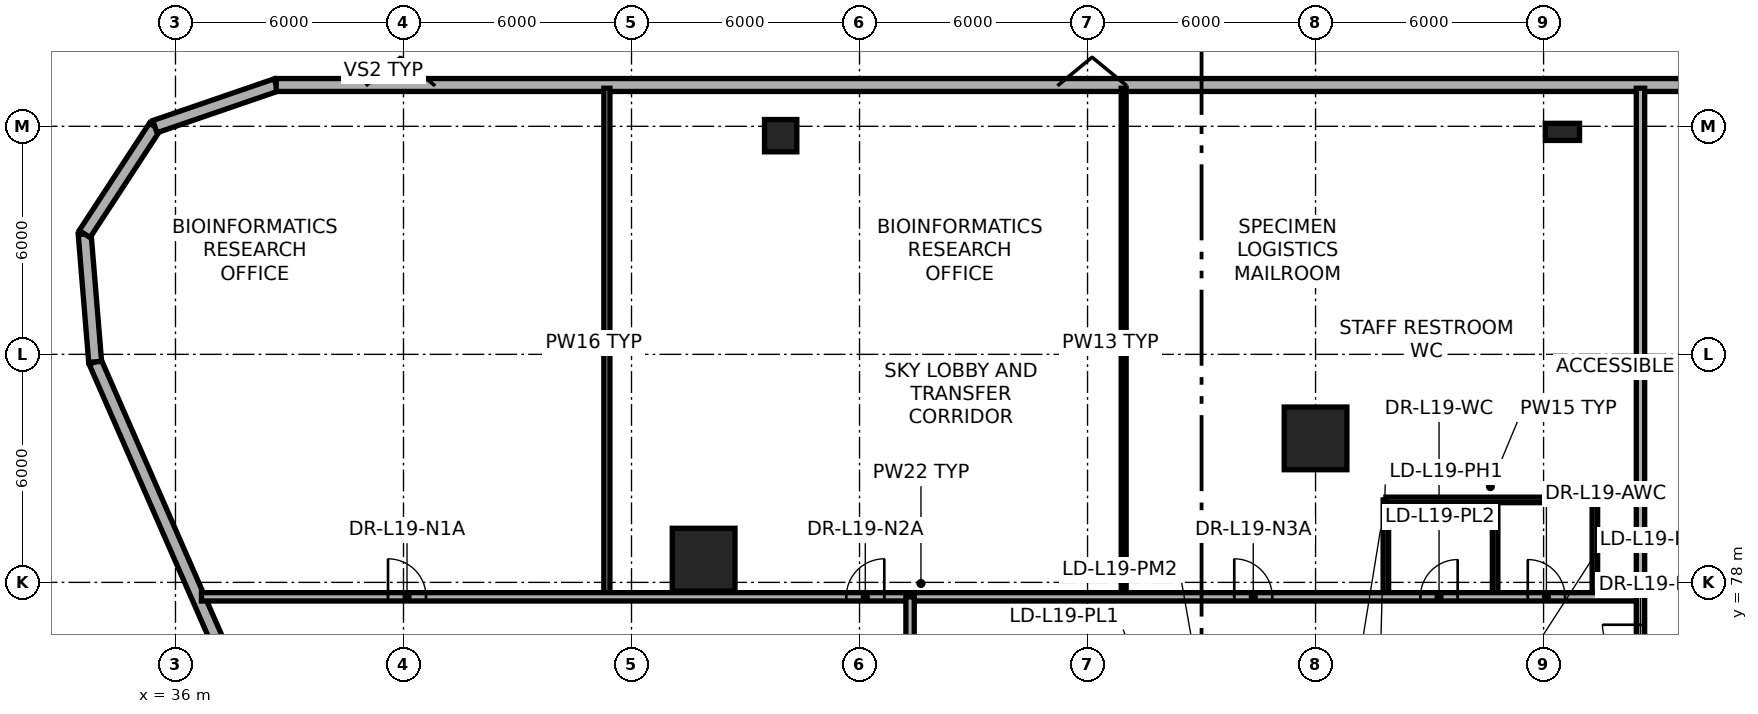
"""IFC4 building model, lengths in metres.
Left out: names, types, materials, properties, quantities, classifications, styles, units other than length and angle.
Written with IfcOpenShell. Run it as: python <this file> out.ifc"""

import sys

from ifc_helpers import new_model, si_unit, direction, frame, frame_2d, origin, origin_2d, place, context, subcontext, project, spatial, rectangle, extrude, element, fill, save


model = new_model("IFC4")
c1 = context("Model", 3, precision=1e-05, world=origin(), true_north=direction((0.0, 1.0)))
c2 = subcontext(c1, "Body", "Model", "MODEL_VIEW")
j1 = project(units=[si_unit("LENGTHUNIT", "METRE"), si_unit("PLANEANGLEUNIT", "RADIAN")], contexts=[c1])
p1 = place(None, origin())
s1 = spatial("IfcSite", under=j1, at=p1, CompositionType="ELEMENT")
p2 = place(p1, origin())
s2 = spatial("IfcBuilding", under=s1, at=p2, CompositionType="ELEMENT")
p3 = place(p2, frame((0.0, 0.0, 75.0)))
s3 = spatial("IfcBuildingStorey", under=s2, at=p3, CompositionType="ELEMENT", Elevation=75.0)
for number, where, z_axis, x_axis in (
    (1, (49.898, 78.599, 0.0), (0.0, 0.0, 1.0), (1.0, 0.0, 0.0)),
    (2, (66.0, 81.789, 0.0), (0.0, 0.0, 1.0), (1.0, 0.0, 0.0)),
):
    element("IfcColumn", number, at=place(p3, frame(where, z_axis=z_axis, x_axis=x_axis)), inside=s3, PredefinedType="COLUMN", context=c2, shape_type="SweptSolid", body=[
        extrude(rectangle(XDim=1.65, YDim=1.65, at=origin_2d()), origin(), (0.0, 0.0, 1.0), 3.65),
    ])
p4 = place(p3, frame((72.519, 89.915, 0.003), z_axis=(-0.012453496874, -0.033544096418, 0.99935964698), x_axis=(-0.937477612418, 0.348045580658, 0.0)))
e3 = element("IfcColumn", 3, at=p4, inside=s3, PredefinedType="PILASTER", context=c2, shape_type="SweptSolid", body=[
    extrude(rectangle(XDim=0.9, YDim=0.45, at=origin_2d()), origin(), (0.0, 0.0, 1.0), 3.646),
])
p5 = place(p3, frame((51.876, 89.815, 0.003), z_axis=(0.026907963191, -0.033534551141, 0.999075270136), x_axis=(-0.779956681152, -0.625833504637, 0.0)))
e4 = element("IfcColumn", 4, at=p5, inside=s3, PredefinedType="COLUMN", context=c2, shape_type="SweptSolid", body=[
    extrude(rectangle(XDim=0.85, YDim=0.85, at=origin_2d()), origin(), (0.0, 0.0, 1.0), 3.647),
])
p6 = place(p3, frame((61.236, 21.291, 0.0), z_axis=(0.0, 0.0, 1.0), x_axis=(-0.400832536075, 0.916151340131, 0.0)))
e5 = element("IfcWall", 5, at=p6, inside=s3, PredefinedType="STANDARD", context=c2, shape_type="SweptSolid", body=[
    extrude(rectangle(XDim=68.233, YDim=0.34, at=frame_2d((34.117, 0.0))), origin(), (0.0, 0.0, 1.0), 0.85),
])
p7 = place(p3, frame((33.886, 83.803, 0.0), z_axis=(0.0, 0.0, 1.0), x_axis=(-0.081806311552, 0.99664824657, 0.0)))
e6 = element("IfcWall", 6, at=p7, inside=s3, PredefinedType="STANDARD", context=c2, shape_type="SweptSolid", body=[
    extrude(rectangle(XDim=3.375, YDim=0.34, at=frame_2d((1.688, 0.0))), origin(), (0.0, 0.0, 1.0), 3.375),
])
p8 = place(p3, frame((33.61, 87.167, 0.0), z_axis=(0.0, 0.0, 1.0), x_axis=(0.54736822803, 0.83689188247, 0.0)))
e7 = element("IfcWall", 7, at=p8, inside=s3, PredefinedType="STANDARD", context=c2, shape_type="SweptSolid", body=[
    extrude(rectangle(XDim=3.375, YDim=0.34, at=frame_2d((1.688, 0.0))), origin(), (0.0, 0.0, 1.0), 3.375),
])
p9 = place(p3, frame((35.458, 89.992, 0.0), z_axis=(0.0, 0.0, 1.0), x_axis=(0.945861583966, 0.324570275868, 0.0)))
e8 = element("IfcWall", 8, at=p9, inside=s3, PredefinedType="STANDARD", context=c2, shape_type="SweptSolid", body=[
    extrude(rectangle(XDim=3.375, YDim=0.34, at=frame_2d((1.688, 0.0))), origin(), (0.0, 0.0, 1.0), 3.375),
])
p10 = place(p3, frame((38.65, 91.087, 0.0), z_axis=(0.0, 0.0, 1.0), x_axis=(1.0, 0.0, 0.0)))
e9 = element("IfcWall", 9, at=p10, inside=s3, PredefinedType="STANDARD", context=c2, shape_type="SweptSolid", body=[
    extrude(rectangle(XDim=54.7, YDim=0.34, at=frame_2d((27.35, 0.0))), origin(), (0.0, 0.0, 1.0), 0.85),
])
p11 = place(p3, frame((98.114, 83.803, 0.0), z_axis=(0.0, 0.0, 1.0), x_axis=(-0.400832536075, -0.916151340131, 0.0)))
e10 = element("IfcWall", 10, at=p11, inside=s3, PredefinedType="STANDARD", context=c2, shape_type="SweptSolid", body=[
    extrude(rectangle(XDim=68.233, YDim=0.34, at=frame_2d((34.117, 0.0))), origin(), (0.0, 0.0, 1.0), 0.85),
])
for number, where, z_axis, x_axis in (
    (11, (67.85, 77.62, 0.0), (0.0, 0.0, 1.0), (0.0, 1.0, 0.0)),
    (12, (70.725, 77.62, 0.0), (0.0, 0.0, 1.0), (0.0, 1.0, 0.0)),
    (13, (73.35, 77.62, 0.0), (0.0, 0.0, 1.0), (0.0, 1.0, 0.0)),
):
    element("IfcWall", number, at=place(p3, frame(where, z_axis=z_axis, x_axis=x_axis)), inside=s3, PredefinedType="PARTITIONING", context=c2, shape_type="SweptSolid", body=[
        extrude(rectangle(XDim=2.55, YDim=0.145, at=frame_2d((1.275, 0.0))), origin(), (0.0, 0.0, 1.0), 2.655),
    ])
p12 = place(p3, frame((67.85, 80.17, 0.0), z_axis=(0.0, 0.0, 1.0), x_axis=(1.0, 0.0, 0.0)))
e14 = element("IfcWall", 14, at=p12, inside=s3, PredefinedType="PARTITIONING", context=c2, shape_type="SweptSolid", body=[
    extrude(rectangle(XDim=5.5, YDim=0.145, at=frame_2d((2.75, 0.0))), origin(), (0.0, 0.0, 1.0), 2.655),
])
p13 = place(p3, frame((47.352, 77.62, 0.0), z_axis=(0.0, 0.0, 1.0), x_axis=(0.0, 1.0, 0.0)))
e15 = element("IfcWall", 15, at=p13, inside=s3, PredefinedType="PARTITIONING", context=c2, shape_type="SweptSolid", body=[
    extrude(rectangle(XDim=13.382, YDim=0.16, at=frame_2d((6.691, 0.0))), origin(), (0.0, 0.0, 1.0), 3.375),
])
p14 = place(p3, frame((60.951, 77.62, 0.0), z_axis=(0.0, 0.0, 1.0), x_axis=(0.0, 1.0, 0.0)))
e16 = element("IfcWall", 16, at=p14, inside=s3, PredefinedType="PARTITIONING", context=c2, shape_type="SweptSolid", body=[
    extrude(rectangle(XDim=13.382, YDim=0.13, at=frame_2d((6.691, 0.0))), origin(), (0.0, 0.0, 1.0), 2.505),
])
p15 = place(p3, frame((36.684, 77.62, 0.0), z_axis=(0.0, 0.0, 1.0), x_axis=(1.0, 0.0, 0.0)))
e17 = element("IfcWall", 17, at=p15, inside=s3, PredefinedType="PARTITIONING", context=c2, shape_type="SweptSolid", body=[
    extrude(rectangle(XDim=37.866, YDim=0.22, at=frame_2d((18.933, 0.0))), origin(), (0.0, 0.0, 1.0), 2.505),
])
p16 = place(p15, frame((32.076, 0.0, 0.0)))
e18 = element("IfcOpeningElement", 18, at=p16, cuts=e17, PredefinedType="OPENING", context=c2, shape_type="SweptSolid", body=[
    extrude(rectangle(XDim=0.98, YDim=2.1, at=frame_2d((0.49, 1.05))), frame((0.0, 0.12, 0.0), z_axis=(0.0, -1.0, 0.0), x_axis=(1.0, 0.0, 0.0)), (0.0, 0.0, 1.0), 0.24),
])
p17 = place(p15, frame((34.901, 0.0, 0.0)))
e19 = element("IfcOpeningElement", 19, at=p17, cuts=e17, PredefinedType="OPENING", context=c2, shape_type="SweptSolid", body=[
    extrude(rectangle(XDim=0.98, YDim=2.1, at=frame_2d((0.49, 1.05))), frame((0.0, 0.12, 0.0), z_axis=(0.0, -1.0, 0.0), x_axis=(1.0, 0.0, 0.0)), (0.0, 0.0, 1.0), 0.24),
])
p18 = place(p15, frame((4.909, 0.0, 0.0)))
e20 = element("IfcOpeningElement", 20, at=p18, cuts=e17, PredefinedType="OPENING", context=c2, shape_type="SweptSolid", body=[
    extrude(rectangle(XDim=1.0, YDim=2.1, at=frame_2d((0.5, 1.05))), frame((0.0, 0.12, 0.0), z_axis=(0.0, -1.0, 0.0), x_axis=(1.0, 0.0, 0.0)), (0.0, 0.0, 1.0), 0.24),
])
p19 = place(p15, frame((16.968, 0.0, 0.0)))
e21 = element("IfcOpeningElement", 21, at=p19, cuts=e17, PredefinedType="OPENING", context=c2, shape_type="SweptSolid", body=[
    extrude(rectangle(XDim=1.0, YDim=2.1, at=frame_2d((0.5, 1.05))), frame((0.0, 0.12, 0.0), z_axis=(0.0, -1.0, 0.0), x_axis=(1.0, 0.0, 0.0)), (0.0, 0.0, 1.0), 0.24),
])
p20 = place(p15, frame((27.177, 0.0, 0.0)))
e22 = element("IfcOpeningElement", 22, at=p20, cuts=e17, PredefinedType="OPENING", context=c2, shape_type="SweptSolid", body=[
    extrude(rectangle(XDim=1.0, YDim=2.1, at=frame_2d((0.5, 1.05))), frame((0.0, 0.12, 0.0), z_axis=(0.0, -1.0, 0.0), x_axis=(1.0, 0.0, 0.0)), (0.0, 0.0, 1.0), 0.24),
])
p21 = place(p3, frame((55.33, 35.002, 0.0), z_axis=(0.0, 0.0, 1.0), x_axis=(0.0, 1.0, 0.0)))
e23 = element("IfcWall", 23, at=p21, inside=s3, PredefinedType="PARTITIONING", context=c2, shape_type="SweptSolid", body=[
    extrude(rectangle(XDim=42.618, YDim=0.22, at=frame_2d((21.309, 0.0))), origin(), (0.0, 0.0, 1.0), 2.505),
])
p22 = place(p21, frame((32.673, 0.0, 0.0)))
e24 = element("IfcOpeningElement", 24, at=p22, cuts=e23, PredefinedType="OPENING", context=c2, shape_type="SweptSolid", body=[
    extrude(rectangle(XDim=1.0, YDim=2.1, at=frame_2d((0.5, 1.05))), frame((0.0, 0.12, 0.0), z_axis=(0.0, -1.0, 0.0), x_axis=(1.0, 0.0, 0.0)), (0.0, 0.0, 1.0), 0.24),
])
p23 = place(p3, frame((74.55, 75.15, 0.0), z_axis=(0.0, 0.0, 1.0), x_axis=(0.0, 1.0, 0.0)))
e25 = element("IfcWall", 25, at=p23, inside=s3, PredefinedType="PARTITIONING", context=c2, shape_type="SweptSolid", body=[
    extrude(rectangle(XDim=15.852, YDim=0.22, at=frame_2d((7.926, 0.0))), origin(), (0.0, 0.0, 1.0), 2.505),
])
p24 = place(p23, frame((0.735, 0.0, 0.0)))
e26 = element("IfcOpeningElement", 26, at=p24, cuts=e25, PredefinedType="OPENING", context=c2, shape_type="SweptSolid", body=[
    extrude(rectangle(XDim=1.0, YDim=2.1, at=frame_2d((0.5, 1.05))), frame((0.0, 0.12, 0.0), z_axis=(0.0, -1.0, 0.0), x_axis=(1.0, 0.0, 0.0)), (0.0, 0.0, 1.0), 0.24),
])
p25 = place(p16, origin())
e27 = element("IfcDoor", 27, at=p25, inside=s3, OperationType="SINGLE_SWING_RIGHT", PredefinedType="DOOR", context=c2, shape_type="SweptSolid", body=[
    extrude(rectangle(XDim=0.98, YDim=2.1, at=frame_2d((0.49, 1.05))), frame((0.0, 0.025, 0.0), z_axis=(0.0, -1.0, 0.0), x_axis=(1.0, 0.0, 0.0)), (0.0, 0.0, 1.0), 0.05),
])
fill(e18, e27)
p26 = place(p17, origin())
e28 = element("IfcDoor", 28, at=p26, inside=s3, OperationType="SINGLE_SWING_LEFT", PredefinedType="DOOR", context=c2, shape_type="SweptSolid", body=[
    extrude(rectangle(XDim=0.98, YDim=2.1, at=frame_2d((0.49, 1.05))), frame((0.0, 0.025, 0.0), z_axis=(0.0, -1.0, 0.0), x_axis=(1.0, 0.0, 0.0)), (0.0, 0.0, 1.0), 0.05),
])
fill(e19, e28)
p27 = place(p18, origin())
e29 = element("IfcDoor", 29, at=p27, inside=s3, OperationType="SINGLE_SWING_LEFT", PredefinedType="DOOR", context=c2, shape_type="SweptSolid", body=[
    extrude(rectangle(XDim=1.0, YDim=2.1, at=frame_2d((0.5, 1.05))), frame((0.0, 0.025, 0.0), z_axis=(0.0, -1.0, 0.0), x_axis=(1.0, 0.0, 0.0)), (0.0, 0.0, 1.0), 0.05),
])
fill(e20, e29)
p28 = place(p19, origin())
e30 = element("IfcDoor", 30, at=p28, inside=s3, OperationType="SINGLE_SWING_RIGHT", PredefinedType="DOOR", context=c2, shape_type="SweptSolid", body=[
    extrude(rectangle(XDim=1.0, YDim=2.1, at=frame_2d((0.5, 1.05))), frame((0.0, 0.025, 0.0), z_axis=(0.0, -1.0, 0.0), x_axis=(1.0, 0.0, 0.0)), (0.0, 0.0, 1.0), 0.05),
])
fill(e21, e30)
p29 = place(p20, origin())
e31 = element("IfcDoor", 31, at=p29, inside=s3, OperationType="SINGLE_SWING_LEFT", PredefinedType="DOOR", context=c2, shape_type="SweptSolid", body=[
    extrude(rectangle(XDim=1.0, YDim=2.1, at=frame_2d((0.5, 1.05))), frame((0.0, 0.025, 0.0), z_axis=(0.0, -1.0, 0.0), x_axis=(1.0, 0.0, 0.0)), (0.0, 0.0, 1.0), 0.05),
])
fill(e22, e31)
p30 = place(p24, origin())
e32 = element("IfcDoor", 32, at=p30, inside=s3, OperationType="SINGLE_SWING_RIGHT", PredefinedType="DOOR", context=c2, shape_type="SweptSolid", body=[
    extrude(rectangle(XDim=1.0, YDim=2.1, at=frame_2d((0.5, 1.05))), frame((0.0, 0.025, 0.0), z_axis=(0.0, -1.0, 0.0), x_axis=(1.0, 0.0, 0.0)), (0.0, 0.0, 1.0), 0.05),
])
fill(e26, e32)
save(model, sys.argv[1])
